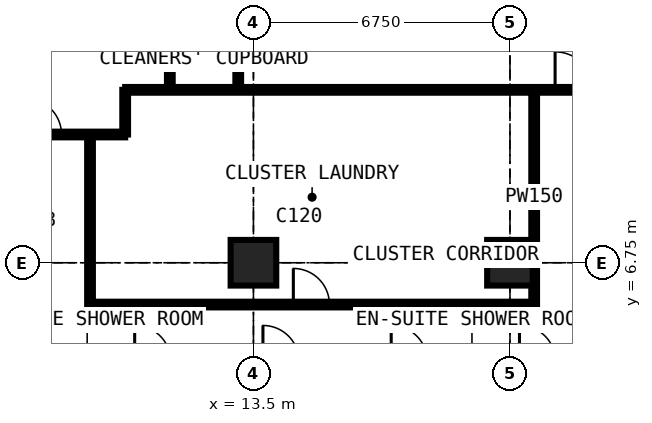
"""IFC4 building model, lengths in metres.
Left out: names, types, materials, properties, quantities, classifications, styles, units other than length and angle.
Written with IfcOpenShell. Run it as: python <this file> out.ifc"""

import sys

from ifc_helpers import new_model, si_unit, direction, frame, frame_2d, origin, origin_2d, place, context, subcontext, project, spatial, rectangle, extrude, element, fill, save


model = new_model("IFC4")
c1 = context("Model", 3, precision=1e-05, world=origin(), true_north=direction((0.0, 1.0)))
c2 = subcontext(c1, "Body", "Model", "MODEL_VIEW")
j1 = project(units=[si_unit("LENGTHUNIT", "METRE"), si_unit("PLANEANGLEUNIT", "RADIAN")], contexts=[c1])
p1 = place(None, origin())
s1 = spatial("IfcSite", under=j1, at=p1, CompositionType="ELEMENT")
p2 = place(p1, origin())
s2 = spatial("IfcBuilding", under=s1, at=p2, CompositionType="ELEMENT")
p3 = place(p2, frame((0.0, 0.0, 171.0)))
s3 = spatial("IfcBuildingStorey", under=s2, at=p3, CompositionType="ELEMENT", Elevation=171.0)
for number, where, z_axis, x_axis in (
    (1, (13.5, 6.75, 0.0), (0.0, 0.0, 1.0), (1.0, 0.0, 0.0)),
    (2, (20.25, 6.75, 0.0), (0.0, 0.0, 1.0), (1.0, 0.0, 0.0)),
):
    element("IfcColumn", number, at=place(p3, frame(where, z_axis=z_axis, x_axis=x_axis)), inside=s3, PredefinedType="COLUMN", context=c2, shape_type="SweptSolid", body=[
        extrude(rectangle(XDim=1.2, YDim=1.2, at=origin_2d()), origin(), (0.0, 0.0, 1.0), 3.6),
    ])
p4 = place(p3, frame((-0.734, 10.125, 0.0), z_axis=(0.0, 0.0, 1.0), x_axis=(1.0, 0.0, 0.0)))
e3 = element("IfcWall", 3, at=p4, inside=s3, PredefinedType="PARTITIONING", context=c2, shape_type="SweptSolid", body=[
    extrude(rectangle(XDim=10.859, YDim=0.15, at=frame_2d((5.429, 0.0))), origin(), (0.0, 0.0, 1.0), 3.375),
])
p5 = place(p4, frame((8.234, 0.0, 0.0)))
e4 = element("IfcOpeningElement", 4, at=p5, cuts=e3, PredefinedType="OPENING", context=c2, shape_type="SweptSolid", body=[
    extrude(rectangle(XDim=0.95, YDim=2.2, at=frame_2d((0.475, 1.1))), frame((0.0, 0.085, 0.0), z_axis=(0.0, -1.0, 0.0), x_axis=(1.0, 0.0, 0.0)), (0.0, 0.0, 1.0), 0.17),
])
p6 = place(p3, frame((9.2, 5.65, 0.0), z_axis=(0.0, 0.0, 1.0), x_axis=(0.0, 1.0, 0.0)))
e5 = element("IfcWall", 5, at=p6, inside=s3, PredefinedType="PARTITIONING", context=c2, shape_type="SweptSolid", body=[
    extrude(rectangle(XDim=4.475, YDim=0.15, at=frame_2d((2.238, 0.0))), origin(), (0.0, 0.0, 1.0), 3.375),
])
p7 = place(p3, frame((9.2, 5.65, 0.0), z_axis=(0.0, 0.0, 1.0), x_axis=(1.0, 0.0, 0.0)))
e6 = element("IfcWall", 6, at=p7, inside=s3, PredefinedType="PARTITIONING", context=c2, shape_type="SweptSolid", body=[
    extrude(rectangle(XDim=11.688, YDim=0.15, at=frame_2d((5.844, 0.0))), origin(), (0.0, 0.0, 1.0), 3.375),
])
p8 = place(p7, frame((5.35, 0.0, 0.0)))
e7 = element("IfcOpeningElement", 7, at=p8, cuts=e6, PredefinedType="OPENING", context=c2, shape_type="SweptSolid", body=[
    extrude(rectangle(XDim=0.95, YDim=2.2, at=frame_2d((0.475, 1.1))), frame((0.0, 0.085, 0.0), z_axis=(0.0, -1.0, 0.0), x_axis=(1.0, 0.0, 0.0)), (0.0, 0.0, 1.0), 0.17),
])
p9 = place(p3, frame((10.125, 10.125, 0.0), z_axis=(0.0, 0.0, 1.0), x_axis=(0.0, 1.0, 0.0)))
e8 = element("IfcWall", 8, at=p9, inside=s3, PredefinedType="PARTITIONING", context=c2, shape_type="SweptSolid", body=[
    extrude(rectangle(XDim=1.175, YDim=0.15, at=frame_2d((0.587, 0.0))), origin(), (0.0, 0.0, 1.0), 3.375),
])
p10 = place(p3, frame((10.125, 11.3, 0.0), z_axis=(0.0, 0.0, 1.0), x_axis=(1.0, 0.0, 0.0)))
e9 = element("IfcWall", 9, at=p10, inside=s3, PredefinedType="PARTITIONING", context=c2, shape_type="SweptSolid", body=[
    extrude(rectangle(XDim=21.475, YDim=0.15, at=frame_2d((10.738, 0.0))), origin(), (0.0, 0.0, 1.0), 3.375),
])
p11 = place(p10, frame((11.312, 0.0, 0.0)))
e10 = element("IfcOpeningElement", 10, at=p11, cuts=e9, PredefinedType="OPENING", context=c2, shape_type="SweptSolid", body=[
    extrude(rectangle(XDim=1.0, YDim=2.2, at=frame_2d((0.5, 1.1))), frame((0.0, 0.085, 0.0), z_axis=(0.0, -1.0, 0.0), x_axis=(1.0, 0.0, 0.0)), (0.0, 0.0, 1.0), 0.17),
])
p12 = place(p3, frame((11.3, 11.3, 0.0), z_axis=(0.0, 0.0, 1.0), x_axis=(0.0, 1.0, 0.0)))
e11 = element("IfcWall", 11, at=p12, inside=s3, PredefinedType="PARTITIONING", context=c2, shape_type="SweptSolid", body=[
    extrude(rectangle(XDim=19.075, YDim=0.15, at=frame_2d((9.538, 0.0))), origin(), (0.0, 0.0, 1.0), 3.375),
])
p13 = place(p12, frame((13.95, 0.0, 0.0)))
e12 = element("IfcOpeningElement", 12, at=p13, cuts=e11, PredefinedType="OPENING", context=c2, shape_type="SweptSolid", body=[
    extrude(rectangle(XDim=1.0, YDim=2.2, at=frame_2d((0.5, 1.1))), frame((0.0, 0.085, 0.0), z_axis=(0.0, -1.0, 0.0), x_axis=(1.0, 0.0, 0.0)), (0.0, 0.0, 1.0), 0.17),
])
p14 = place(p3, frame((13.1, 11.3, 0.0), z_axis=(0.0, 0.0, 1.0), x_axis=(0.0, 1.0, 0.0)))
e13 = element("IfcWall", 13, at=p14, inside=s3, PredefinedType="PARTITIONING", context=c2, shape_type="SweptSolid", body=[
    extrude(rectangle(XDim=1.6, YDim=0.15, at=frame_2d((0.8, 0.0))), origin(), (0.0, 0.0, 1.0), 3.375),
])
p15 = place(p3, frame((20.887, 5.65, 0.0), z_axis=(0.0, 0.0, 1.0), x_axis=(0.0, 1.0, 0.0)))
e14 = element("IfcWall", 14, at=p15, inside=s3, PredefinedType="PARTITIONING", context=c2, shape_type="SweptSolid", body=[
    extrude(rectangle(XDim=5.65, YDim=0.15, at=frame_2d((2.825, 0.0))), origin(), (0.0, 0.0, 1.0), 3.375),
])
p16 = place(p11, origin())
e15 = element("IfcDoor", 15, at=p16, inside=s3, OperationType="SINGLE_SWING_LEFT", PredefinedType="DOOR", context=c2, shape_type="SweptSolid", body=[
    extrude(rectangle(XDim=1.0, YDim=2.2, at=frame_2d((0.5, 1.1))), frame((0.0, 0.025, 0.0), z_axis=(0.0, -1.0, 0.0), x_axis=(1.0, 0.0, 0.0)), (0.0, 0.0, 1.0), 0.05),
])
fill(e10, e15)
p17 = place(p8, origin())
e16 = element("IfcDoor", 16, at=p17, inside=s3, OperationType="SINGLE_SWING_LEFT", PredefinedType="DOOR", context=c2, shape_type="SweptSolid", body=[
    extrude(rectangle(XDim=0.95, YDim=2.2, at=frame_2d((0.475, 1.1))), frame((0.0, 0.025, 0.0), z_axis=(0.0, -1.0, 0.0), x_axis=(1.0, 0.0, 0.0)), (0.0, 0.0, 1.0), 0.05),
])
fill(e7, e16)
p18 = place(p5, origin())
e17 = element("IfcDoor", 17, at=p18, inside=s3, OperationType="SINGLE_SWING_LEFT", PredefinedType="DOOR", context=c2, shape_type="SweptSolid", body=[
    extrude(rectangle(XDim=0.95, YDim=2.2, at=frame_2d((0.475, 1.1))), frame((0.0, 0.025, 0.0), z_axis=(0.0, -1.0, 0.0), x_axis=(1.0, 0.0, 0.0)), (0.0, 0.0, 1.0), 0.05),
])
fill(e4, e17)
save(model, sys.argv[1])
